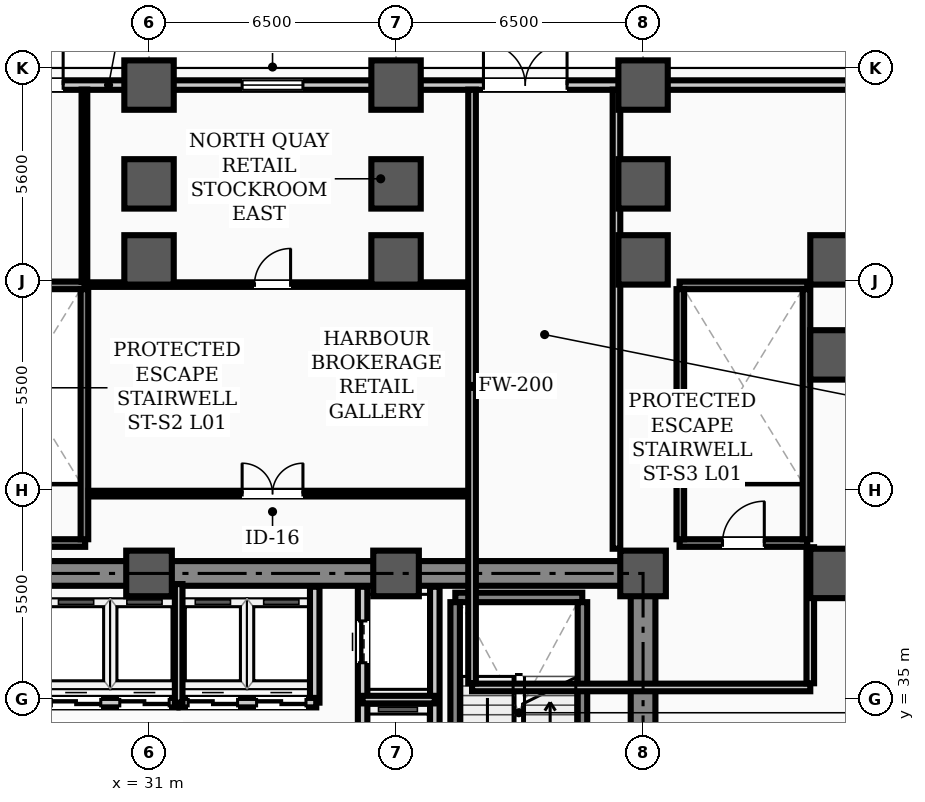
"""IFC4 building model, lengths in metres.
Left out: names, types, materials, properties, quantities, classifications, styles, units other than length and angle.
Written with IfcOpenShell. Run it as: python <this file> out.ifc"""

import sys

from ifc_helpers import new_model, si_unit, direction, frame, frame_2d, origin, origin_2d, place, context, subcontext, project, spatial, rectangle, hollow_rectangle, extrude, element, fill, save


model = new_model("IFC4")
c1 = context("Model", 3, precision=1e-05, world=origin(), true_north=direction((0.0, 1.0)))
c2 = subcontext(c1, "Body", "Model", "MODEL_VIEW")
j1 = project(units=[si_unit("LENGTHUNIT", "METRE"), si_unit("PLANEANGLEUNIT", "RADIAN")], contexts=[c1])
p1 = place(None, origin())
s1 = spatial("IfcSite", under=j1, at=p1, CompositionType="ELEMENT")
p2 = place(p1, origin())
s2 = spatial("IfcBuilding", under=s1, at=p2, CompositionType="ELEMENT")
p3 = place(p2, origin())
s3 = spatial("IfcBuildingStorey", under=s2, at=p3, CompositionType="ELEMENT", Elevation=0.0)
for number, where, z_axis, x_axis in (
    (1, (31.0, 38.3, 0.0), (0.0, 0.0, 1.0), (1.0, 0.0, 0.0)),
    (2, (37.5, 38.3, 0.0), (0.0, 0.0, 1.0), (1.0, 0.0, 0.0)),
    (3, (44.0, 38.3, 0.0), (0.0, 0.0, 1.0), (1.0, 0.0, 0.0)),
):
    element("IfcColumn", number, at=place(p3, frame(where, z_axis=z_axis, x_axis=x_axis)), inside=s3, PredefinedType="COLUMN", context=c2, shape_type="SweptSolid", body=[
        extrude(hollow_rectangle(XDim=1.2, YDim=1.2, WallThickness=0.04, InnerFilletRadius=0.02, OuterFilletRadius=0.06, at=origin_2d()), origin(), (0.0, 0.0, 1.0), 5.8),
    ])
for number, where, z_axis, x_axis in (
    (4, (31.0, 46.55, 0.0), (0.0, 0.0, 1.0), (1.0, 0.0, 0.0)),
    (5, (31.0, 48.55, 0.0), (0.0, 0.0, 1.0), (1.0, 0.0, 0.0)),
    (6, (31.0, 51.15, 0.0), (0.0, 0.0, 1.0), (1.0, 0.0, 0.0)),
    (7, (37.5, 46.55, 0.0), (0.0, 0.0, 1.0), (1.0, 0.0, 0.0)),
    (8, (37.5, 48.55, 0.0), (0.0, 0.0, 1.0), (1.0, 0.0, 0.0)),
    (9, (37.5, 51.15, 0.0), (0.0, 0.0, 1.0), (1.0, 0.0, 0.0)),
    (10, (44.0, 46.55, 0.0), (0.0, 0.0, 1.0), (1.0, 0.0, 0.0)),
    (11, (44.0, 48.55, 0.0), (0.0, 0.0, 1.0), (1.0, 0.0, 0.0)),
    (12, (44.0, 51.15, 0.0), (0.0, 0.0, 1.0), (1.0, 0.0, 0.0)),
    (13, (49.05, 38.3, 0.0), (0.0, 0.0, 1.0), (1.0, 0.0, 0.0)),
    (14, (49.05, 44.05, 0.0), (0.0, 0.0, 1.0), (1.0, 0.0, 0.0)),
    (15, (49.05, 46.55, 0.0), (0.0, 0.0, 1.0), (1.0, 0.0, 0.0)),
):
    element("IfcColumn", number, at=place(p3, frame(where, z_axis=z_axis, x_axis=x_axis)), inside=s3, PredefinedType="COLUMN", context=c2, shape_type="SweptSolid", body=[
        extrude(rectangle(XDim=1.3, YDim=1.3, at=origin_2d()), origin(), (0.0, 0.0, 1.0), 5.8),
    ])
p4 = place(p3, frame((0.45, 51.15, 0.0), z_axis=(0.0, 0.0, 1.0), x_axis=(1.0, 0.0, 0.0)))
e16 = element("IfcWall", 16, at=p4, inside=s3, PredefinedType="STANDARD", context=c2, shape_type="SweptSolid", body=[
    extrude(rectangle(XDim=58.97, YDim=0.25, at=frame_2d((29.485, 0.0))), origin(), (0.0, 0.0, 1.0), 4.75),
])
p5 = place(p4, frame((6.49, 0.0, 0.0)))
e17 = element("IfcOpeningElement", 17, at=p5, cuts=e16, PredefinedType="OPENING", context=c2, shape_type="SweptSolid", body=[
    extrude(rectangle(XDim=2.2, YDim=2.4, at=frame_2d((1.1, 1.2))), frame((0.0, 0.135, 0.0), z_axis=(0.0, -1.0, 0.0), x_axis=(1.0, 0.0, 0.0)), (0.0, 0.0, 1.0), 0.27),
])
p6 = place(p4, frame((17.25, 0.0, 0.0)))
e18 = element("IfcOpeningElement", 18, at=p6, cuts=e16, PredefinedType="OPENING", context=c2, shape_type="SweptSolid", body=[
    extrude(rectangle(XDim=2.2, YDim=2.4, at=frame_2d((1.1, 1.2))), frame((0.0, 0.135, 0.0), z_axis=(0.0, -1.0, 0.0), x_axis=(1.0, 0.0, 0.0)), (0.0, 0.0, 1.0), 0.27),
])
p7 = place(p4, frame((26.09, 0.0, 0.0)))
e19 = element("IfcOpeningElement", 19, at=p7, cuts=e16, PredefinedType="OPENING", context=c2, shape_type="SweptSolid", body=[
    extrude(rectangle(XDim=2.2, YDim=2.4, at=frame_2d((1.1, 1.2))), frame((0.0, 0.135, 0.0), z_axis=(0.0, -1.0, 0.0), x_axis=(1.0, 0.0, 0.0)), (0.0, 0.0, 1.0), 0.27),
])
p8 = place(p4, frame((39.35, 0.0, 0.0)))
e20 = element("IfcOpeningElement", 20, at=p8, cuts=e16, PredefinedType="OPENING", context=c2, shape_type="SweptSolid", body=[
    extrude(rectangle(XDim=2.2, YDim=2.4, at=frame_2d((1.1, 1.2))), frame((0.0, 0.135, 0.0), z_axis=(0.0, -1.0, 0.0), x_axis=(1.0, 0.0, 0.0)), (0.0, 0.0, 1.0), 0.27),
])
p9 = place(p4, frame((33.0, 0.0, 1.05)))
e21 = element("IfcOpeningElement", 21, at=p9, cuts=e16, PredefinedType="OPENING", context=c2, shape_type="SweptSolid", body=[
    extrude(rectangle(XDim=1.6, YDim=1.5, at=frame_2d((0.8, 0.75))), frame((0.0, 0.135, 0.0), z_axis=(0.0, -1.0, 0.0), x_axis=(1.0, 0.0, 0.0)), (0.0, 0.0, 1.0), 0.27),
])
p10 = place(p3, frame((13.5, 38.3, 0.0), z_axis=(0.0, 0.0, 1.0), x_axis=(1.0, 0.0, 0.0)))
e22 = element("IfcWall", 22, at=p10, inside=s3, PredefinedType="SHEAR", context=c2, shape_type="SweptSolid", body=[
    extrude(rectangle(XDim=30.5, YDim=0.65, at=frame_2d((15.25, 0.0))), origin(), (0.0, 0.0, 1.0), 5.55),
])
p11 = place(p3, frame((44.0, 29.35, 0.0), z_axis=(0.0, 0.0, 1.0), x_axis=(0.0, 1.0, 0.0)))
e23 = element("IfcWall", 23, at=p11, inside=s3, PredefinedType="SHEAR", context=c2, shape_type="SweptSolid", body=[
    extrude(rectangle(XDim=8.6, YDim=0.65, at=frame_2d((4.3, 0.0))), origin(), (0.0, 0.0, 1.0), 5.55),
])
p12 = place(p3, frame((39.06, 37.669, 0.0), z_axis=(0.0, 0.0, 1.0), x_axis=(1.0, 0.0, 0.0)))
e24 = element("IfcWall", 24, at=p12, inside=s3, PredefinedType="STANDARD", context=c2, shape_type="SweptSolid", body=[
    extrude(rectangle(XDim=3.34, YDim=0.25, at=frame_2d((1.67, 0.0))), origin(), (0.0, 0.0, 1.0), 5.55),
])
for number, where, z_axis, x_axis in (
    (25, (39.055, 30.36, 0.0), (0.0, 0.0, 1.0), (0.0, 1.0, 0.0)),
    (26, (42.405, 30.36, 0.0), (0.0, 0.0, 1.0), (0.0, 1.0, 0.0)),
):
    element("IfcWall", number, at=place(p3, frame(where, z_axis=z_axis, x_axis=x_axis)), inside=s3, PredefinedType="STANDARD", context=c2, shape_type="SweptSolid", body=[
        extrude(rectangle(XDim=7.184, YDim=0.25, at=frame_2d((3.592, 0.0))), origin(), (0.0, 0.0, 1.0), 5.55),
    ])
p13 = place(p3, frame((36.62, 31.95, 0.0), z_axis=(0.0, 0.0, 1.0), x_axis=(0.0, 1.0, 0.0)))
e27 = element("IfcWall", 27, at=p13, inside=s3, PredefinedType="STANDARD", context=c2, shape_type="SweptSolid", body=[
    extrude(rectangle(XDim=6.0, YDim=0.25, at=frame_2d((3.0, 0.0))), origin(), (0.0, 0.0, 1.0), 4.73),
])
p14 = place(p13, frame((0.9, 0.0, 0.0)))
e28 = element("IfcOpeningElement", 28, at=p14, cuts=e27, PredefinedType="OPENING", context=c2, shape_type="SweptSolid", body=[
    extrude(rectangle(XDim=1.1, YDim=2.08, at=frame_2d((0.55, 1.04))), frame((0.0, 0.135, 0.0), z_axis=(0.0, -1.0, 0.0), x_axis=(1.0, 0.0, 0.0)), (0.0, 0.0, 1.0), 0.27),
])
p15 = place(p13, frame((4.0, 0.0, 0.0)))
e29 = element("IfcOpeningElement", 29, at=p15, cuts=e27, PredefinedType="OPENING", context=c2, shape_type="SweptSolid", body=[
    extrude(rectangle(XDim=1.1, YDim=2.08, at=frame_2d((0.55, 1.04))), frame((0.0, 0.135, 0.0), z_axis=(0.0, -1.0, 0.0), x_axis=(1.0, 0.0, 0.0)), (0.0, 0.0, 1.0), 0.27),
])
p16 = place(p3, frame((38.52, 31.95, 0.0), z_axis=(0.0, 0.0, 1.0), x_axis=(0.0, 1.0, 0.0)))
e30 = element("IfcWall", 30, at=p16, inside=s3, PredefinedType="STANDARD", context=c2, shape_type="SweptSolid", body=[
    extrude(rectangle(XDim=6.0, YDim=0.25, at=frame_2d((3.0, 0.0))), origin(), (0.0, 0.0, 1.0), 4.73),
])
p17 = place(p3, frame((35.36, 34.9, 0.0), z_axis=(0.0, 0.0, 1.0), x_axis=(0.0, 1.0, 0.0)))
e31 = element("IfcWall", 31, at=p17, inside=s3, PredefinedType="STANDARD", context=c2, shape_type="SweptSolid", body=[
    extrude(rectangle(XDim=3.05, YDim=0.25, at=frame_2d((1.525, 0.0))), origin(), (0.0, 0.0, 1.0), 4.73),
])
p18 = place(p3, frame((28.2, 34.9, 0.0), z_axis=(0.0, 0.0, 1.0), x_axis=(1.0, 0.0, 0.0)))
e32 = element("IfcWall", 32, at=p18, inside=s3, PredefinedType="STANDARD", context=c2, shape_type="SweptSolid", body=[
    extrude(rectangle(XDim=3.55, YDim=0.25, at=frame_2d((1.775, 0.0))), origin(), (0.0, 0.0, 1.0), 5.55),
])
p19 = place(p18, frame((0.23, 0.0, 0.0)))
e33 = element("IfcOpeningElement", 33, at=p19, cuts=e32, PredefinedType="OPENING", context=c2, shape_type="SweptSolid", body=[
    extrude(rectangle(XDim=1.3, YDim=2.08, at=frame_2d((0.65, 1.04))), frame((0.0, 0.135, 0.0), z_axis=(0.0, -1.0, 0.0), x_axis=(1.0, 0.0, 0.0)), (0.0, 0.0, 1.0), 0.27),
])
p20 = place(p18, frame((2.03, 0.0, 0.0)))
e34 = element("IfcOpeningElement", 34, at=p20, cuts=e32, PredefinedType="OPENING", context=c2, shape_type="SweptSolid", body=[
    extrude(rectangle(XDim=1.3, YDim=2.08, at=frame_2d((0.65, 1.04))), frame((0.0, 0.135, 0.0), z_axis=(0.0, -1.0, 0.0), x_axis=(1.0, 0.0, 0.0)), (0.0, 0.0, 1.0), 0.27),
])
p21 = place(p3, frame((31.8, 34.9, 0.0), z_axis=(0.0, 0.0, 1.0), x_axis=(1.0, 0.0, 0.0)))
e35 = element("IfcWall", 35, at=p21, inside=s3, PredefinedType="STANDARD", context=c2, shape_type="SweptSolid", body=[
    extrude(rectangle(XDim=3.6, YDim=0.25, at=frame_2d((1.8, 0.0))), origin(), (0.0, 0.0, 1.0), 5.55),
])
p22 = place(p21, frame((0.23, 0.0, 0.0)))
e36 = element("IfcOpeningElement", 36, at=p22, cuts=e35, PredefinedType="OPENING", context=c2, shape_type="SweptSolid", body=[
    extrude(rectangle(XDim=1.3, YDim=2.08, at=frame_2d((0.65, 1.04))), frame((0.0, 0.135, 0.0), z_axis=(0.0, -1.0, 0.0), x_axis=(1.0, 0.0, 0.0)), (0.0, 0.0, 1.0), 0.27),
])
p23 = place(p21, frame((2.03, 0.0, 0.0)))
e37 = element("IfcOpeningElement", 37, at=p23, cuts=e35, PredefinedType="OPENING", context=c2, shape_type="SweptSolid", body=[
    extrude(rectangle(XDim=1.3, YDim=2.08, at=frame_2d((0.65, 1.04))), frame((0.0, 0.135, 0.0), z_axis=(0.0, -1.0, 0.0), x_axis=(1.0, 0.0, 0.0)), (0.0, 0.0, 1.0), 0.27),
])
p24 = place(p3, frame((25.96, 39.1, 0.0), z_axis=(0.0, 0.0, 1.0), x_axis=(1.0, 0.0, 0.0)))
e38 = element("IfcWall", 38, at=p24, inside=s3, PredefinedType="STANDARD", context=c2, shape_type="SweptSolid", body=[
    extrude(rectangle(XDim=3.36, YDim=0.2, at=frame_2d((1.68, 0.0))), origin(), (0.0, 0.0, 1.0), 5.55),
])
p25 = place(p24, frame((1.13, 0.0, 0.0)))
e39 = element("IfcOpeningElement", 39, at=p25, cuts=e38, PredefinedType="OPENING", context=c2, shape_type="SweptSolid", body=[
    extrude(rectangle(XDim=1.1, YDim=2.08, at=frame_2d((0.55, 1.04))), frame((0.0, 0.11, 0.0), z_axis=(0.0, -1.0, 0.0), x_axis=(1.0, 0.0, 0.0)), (0.0, 0.0, 1.0), 0.22),
])
p26 = place(p3, frame((25.96, 45.88, 0.0), z_axis=(0.0, 0.0, 1.0), x_axis=(1.0, 0.0, 0.0)))
e40 = element("IfcWall", 40, at=p26, inside=s3, PredefinedType="STANDARD", context=c2, shape_type="SweptSolid", body=[
    extrude(rectangle(XDim=3.36, YDim=0.2, at=frame_2d((1.68, 0.0))), origin(), (0.0, 0.0, 1.0), 5.55),
])
p27 = place(p3, frame((29.3, 39.2, 0.0), z_axis=(0.0, 0.0, 1.0), x_axis=(0.0, 1.0, 0.0)))
e41 = element("IfcWall", 41, at=p27, inside=s3, PredefinedType="STANDARD", context=c2, shape_type="SweptSolid", body=[
    extrude(rectangle(XDim=6.58, YDim=0.2, at=frame_2d((3.29, 0.0))), origin(), (0.0, 0.0, 1.0), 5.55),
])
p28 = place(p3, frame((44.96, 39.1, 0.0), z_axis=(0.0, 0.0, 1.0), x_axis=(1.0, 0.0, 0.0)))
e42 = element("IfcWall", 42, at=p28, inside=s3, PredefinedType="STANDARD", context=c2, shape_type="SweptSolid", body=[
    extrude(rectangle(XDim=3.36, YDim=0.2, at=frame_2d((1.68, 0.0))), origin(), (0.0, 0.0, 1.0), 5.55),
])
p29 = place(p28, frame((1.13, 0.0, 0.0)))
e43 = element("IfcOpeningElement", 43, at=p29, cuts=e42, PredefinedType="OPENING", context=c2, shape_type="SweptSolid", body=[
    extrude(rectangle(XDim=1.1, YDim=2.08, at=frame_2d((0.55, 1.04))), frame((0.0, 0.11, 0.0), z_axis=(0.0, -1.0, 0.0), x_axis=(1.0, 0.0, 0.0)), (0.0, 0.0, 1.0), 0.22),
])
p30 = place(p3, frame((44.96, 45.88, 0.0), z_axis=(0.0, 0.0, 1.0), x_axis=(1.0, 0.0, 0.0)))
e44 = element("IfcWall", 44, at=p30, inside=s3, PredefinedType="STANDARD", context=c2, shape_type="SweptSolid", body=[
    extrude(rectangle(XDim=3.36, YDim=0.2, at=frame_2d((1.68, 0.0))), origin(), (0.0, 0.0, 1.0), 5.55),
])
for number, where, z_axis, x_axis in (
    (45, (44.98, 39.2, 0.0), (0.0, 0.0, 1.0), (0.0, 1.0, 0.0)),
    (46, (48.3, 39.2, 0.0), (0.0, 0.0, 1.0), (0.0, 1.0, 0.0)),
):
    element("IfcWall", number, at=place(p3, frame(where, z_axis=z_axis, x_axis=x_axis)), inside=s3, PredefinedType="STANDARD", context=c2, shape_type="SweptSolid", body=[
        extrude(rectangle(XDim=6.58, YDim=0.2, at=frame_2d((3.29, 0.0))), origin(), (0.0, 0.0, 1.0), 5.55),
    ])
p31 = place(p3, frame((29.3, 45.9, 0.0), z_axis=(0.0, 0.0, 1.0), x_axis=(1.0, 0.0, 0.0)))
e47 = element("IfcWall", 47, at=p31, inside=s3, PredefinedType="PARTITIONING", context=c2, shape_type="SweptSolid", body=[
    extrude(rectangle(XDim=10.2, YDim=0.12, at=frame_2d((5.1, 0.0))), origin(), (0.0, 0.0, 1.0), 4.83),
])
p32 = place(p31, frame((4.475, 0.0, 0.0)))
e48 = element("IfcOpeningElement", 48, at=p32, cuts=e47, PredefinedType="OPENING", context=c2, shape_type="SweptSolid", body=[
    extrude(rectangle(XDim=0.95, YDim=2.08, at=frame_2d((0.475, 1.04))), frame((0.0, 0.07, 0.0), z_axis=(0.0, -1.0, 0.0), x_axis=(1.0, 0.0, 0.0)), (0.0, 0.0, 1.0), 0.14),
])
p33 = place(p3, frame((39.5, 35.3, 0.0), z_axis=(0.0, 0.0, 1.0), x_axis=(1.0, 0.0, 0.0)))
e49 = element("IfcWall", 49, at=p33, inside=s3, PredefinedType="STANDARD", context=c2, shape_type="SweptSolid", body=[
    extrude(rectangle(XDim=8.9, YDim=0.2, at=frame_2d((4.45, 0.0))), origin(), (0.0, 0.0, 1.0), 4.83),
])
p34 = place(p3, frame((29.41, 40.4, 0.0), z_axis=(0.0, 0.0, 1.0), x_axis=(1.0, 0.0, 0.0)))
e50 = element("IfcWall", 50, at=p34, inside=s3, PredefinedType="PARTITIONING", context=c2, shape_type="SweptSolid", body=[
    extrude(rectangle(XDim=10.09, YDim=0.15, at=frame_2d((5.045, 0.0))), origin(), (0.0, 0.0, 1.0), 4.83),
])
p35 = place(p34, frame((4.04, 0.0, 0.0)))
e51 = element("IfcOpeningElement", 51, at=p35, cuts=e50, PredefinedType="OPENING", context=c2, shape_type="SweptSolid", body=[
    extrude(rectangle(XDim=1.6, YDim=2.08, at=frame_2d((0.8, 1.04))), frame((0.0, 0.085, 0.0), z_axis=(0.0, -1.0, 0.0), x_axis=(1.0, 0.0, 0.0)), (0.0, 0.0, 1.0), 0.17),
])
p36 = place(p3, frame((29.3, 45.97, 0.0), z_axis=(0.0, 0.0, 1.0), x_axis=(0.0, 1.0, 0.0)))
e52 = element("IfcWall", 52, at=p36, inside=s3, PredefinedType="PARTITIONING", context=c2, shape_type="SweptSolid", body=[
    extrude(rectangle(XDim=5.06, YDim=0.15, at=frame_2d((2.53, 0.0))), origin(), (0.0, 0.0, 1.0), 4.73),
])
p37 = place(p3, frame((48.4, 35.41, 0.0), z_axis=(0.0, 0.0, 1.0), x_axis=(0.0, 1.0, 0.0)))
e53 = element("IfcWall", 53, at=p37, inside=s3, PredefinedType="STANDARD", context=c2, shape_type="SweptSolid", body=[
    extrude(rectangle(XDim=3.58, YDim=0.2, at=frame_2d((1.79, 0.0))), origin(), (0.0, 0.0, 1.0), 4.73),
])
p38 = place(p3, frame((39.5, 35.41, 0.0), z_axis=(0.0, 0.0, 1.0), x_axis=(0.0, 1.0, 0.0)))
e54 = element("IfcWall", 54, at=p38, inside=s3, PredefinedType="STANDARD", context=c2, shape_type="SweptSolid", body=[
    extrude(rectangle(XDim=15.62, YDim=0.2, at=frame_2d((7.81, 0.0))), origin(), (0.0, 0.0, 1.0), 4.73),
])
p39 = place(p3, frame((43.3, 38.95, 0.0), z_axis=(0.0, 0.0, 1.0), x_axis=(0.0, 1.0, 0.0)))
e55 = element("IfcWall", 55, at=p39, inside=s3, PredefinedType="STANDARD", context=c2, shape_type="SweptSolid", body=[
    extrude(rectangle(XDim=12.08, YDim=0.2, at=frame_2d((6.04, 0.0))), origin(), (0.0, 0.0, 1.0), 4.73),
])
p40 = place(p3, frame((36.62, 34.98, 0.0), z_axis=(0.0, 0.0, 1.0), x_axis=(1.0, 0.0, 0.0)))
e56 = element("IfcWall", 56, at=p40, inside=s3, PredefinedType="STANDARD", context=c2, shape_type="SweptSolid", body=[
    extrude(rectangle(XDim=1.9, YDim=0.2, at=frame_2d((0.95, 0.0))), origin(), (0.0, 0.0, 1.0), 5.55),
])
p41 = place(p3, frame((31.78, 34.9, 0.0), z_axis=(0.0, 0.0, 1.0), x_axis=(0.0, 1.0, 0.0)))
e57 = element("IfcWall", 57, at=p41, inside=s3, PredefinedType="STANDARD", context=c2, shape_type="SweptSolid", body=[
    extrude(rectangle(XDim=3.12, YDim=0.2, at=frame_2d((1.56, 0.0))), origin(), (0.0, 0.0, 1.0), 4.73),
])
p42 = place(p7, origin())
e58 = element("IfcDoor", 58, at=p42, inside=s3, OperationType="DOUBLE_DOOR_SINGLE_SWING", PredefinedType="DOOR", context=c2, shape_type="SweptSolid", body=[
    extrude(rectangle(XDim=2.2, YDim=2.4, at=frame_2d((1.1, 1.2))), frame((0.0, 0.025, 0.0), z_axis=(0.0, -1.0, 0.0), x_axis=(1.0, 0.0, 0.0)), (0.0, 0.0, 1.0), 0.05),
])
fill(e19, e58)
p43 = place(p8, origin())
e59 = element("IfcDoor", 59, at=p43, inside=s3, OperationType="DOUBLE_DOOR_SINGLE_SWING", PredefinedType="DOOR", context=c2, shape_type="SweptSolid", body=[
    extrude(rectangle(XDim=2.2, YDim=2.4, at=frame_2d((1.1, 1.2))), frame((0.0, 0.025, 0.0), z_axis=(0.0, -1.0, 0.0), x_axis=(1.0, 0.0, 0.0)), (0.0, 0.0, 1.0), 0.05),
])
fill(e20, e59)
p44 = place(p9, origin())
e60 = element("IfcWindow", 60, at=p44, inside=s3, PartitioningType="SINGLE_PANEL", PredefinedType="WINDOW", context=c2, shape_type="SweptSolid", body=[
    extrude(rectangle(XDim=1.6, YDim=1.5, at=frame_2d((0.8, 0.75))), frame((0.0, 0.03, 0.0), z_axis=(0.0, -1.0, 0.0), x_axis=(1.0, 0.0, 0.0)), (0.0, 0.0, 1.0), 0.06),
])
fill(e21, e60)
p45 = place(p29, origin())
e61 = element("IfcDoor", 61, at=p45, inside=s3, OperationType="SINGLE_SWING_RIGHT", PredefinedType="DOOR", context=c2, shape_type="SweptSolid", body=[
    extrude(rectangle(XDim=1.1, YDim=2.08, at=frame_2d((0.55, 1.04))), frame((0.0, 0.025, 0.0), z_axis=(0.0, -1.0, 0.0), x_axis=(1.0, 0.0, 0.0)), (0.0, 0.0, 1.0), 0.05),
])
fill(e43, e61)
p46 = place(p35, origin())
e62 = element("IfcDoor", 62, at=p46, inside=s3, OperationType="DOUBLE_DOOR_SINGLE_SWING", PredefinedType="DOOR", context=c2, shape_type="SweptSolid", body=[
    extrude(rectangle(XDim=1.6, YDim=2.08, at=frame_2d((0.8, 1.04))), frame((0.0, 0.025, 0.0), z_axis=(0.0, -1.0, 0.0), x_axis=(1.0, 0.0, 0.0)), (0.0, 0.0, 1.0), 0.05),
])
fill(e51, e62)
p47 = place(p32, origin())
e63 = element("IfcDoor", 63, at=p47, inside=s3, OperationType="SINGLE_SWING_RIGHT", PredefinedType="DOOR", context=c2, shape_type="SweptSolid", body=[
    extrude(rectangle(XDim=0.95, YDim=2.08, at=frame_2d((0.475, 1.04))), frame((0.0, 0.025, 0.0), z_axis=(0.0, -1.0, 0.0), x_axis=(1.0, 0.0, 0.0)), (0.0, 0.0, 1.0), 0.05),
])
fill(e48, e63)
p48 = place(p15, origin())
e64 = element("IfcDoor", 64, at=p48, inside=s3, OperationType="SLIDING_TO_LEFT", PredefinedType="DOOR", context=c2, shape_type="SweptSolid", body=[
    extrude(rectangle(XDim=1.1, YDim=2.08, at=frame_2d((0.55, 1.04))), frame((0.0, 0.025, 0.0), z_axis=(0.0, -1.0, 0.0), x_axis=(1.0, 0.0, 0.0)), (0.0, 0.0, 1.0), 0.05),
])
fill(e29, e64)
p49 = place(p19, origin())
e65 = element("IfcDoor", 65, at=p49, inside=s3, OperationType="DOUBLE_DOOR_SLIDING", PredefinedType="DOOR", context=c2, shape_type="SweptSolid", body=[
    extrude(rectangle(XDim=1.3, YDim=2.08, at=frame_2d((0.65, 1.04))), frame((0.0, 0.025, 0.0), z_axis=(0.0, -1.0, 0.0), x_axis=(1.0, 0.0, 0.0)), (0.0, 0.0, 1.0), 0.05),
])
fill(e33, e65)
p50 = place(p20, origin())
e66 = element("IfcDoor", 66, at=p50, inside=s3, OperationType="DOUBLE_DOOR_SLIDING", PredefinedType="DOOR", context=c2, shape_type="SweptSolid", body=[
    extrude(rectangle(XDim=1.3, YDim=2.08, at=frame_2d((0.65, 1.04))), frame((0.0, 0.025, 0.0), z_axis=(0.0, -1.0, 0.0), x_axis=(1.0, 0.0, 0.0)), (0.0, 0.0, 1.0), 0.05),
])
fill(e34, e66)
p51 = place(p22, origin())
e67 = element("IfcDoor", 67, at=p51, inside=s3, OperationType="DOUBLE_DOOR_SLIDING", PredefinedType="DOOR", context=c2, shape_type="SweptSolid", body=[
    extrude(rectangle(XDim=1.3, YDim=2.08, at=frame_2d((0.65, 1.04))), frame((0.0, 0.025, 0.0), z_axis=(0.0, -1.0, 0.0), x_axis=(1.0, 0.0, 0.0)), (0.0, 0.0, 1.0), 0.05),
])
fill(e36, e67)
p52 = place(p23, origin())
e68 = element("IfcDoor", 68, at=p52, inside=s3, OperationType="DOUBLE_DOOR_SLIDING", PredefinedType="DOOR", context=c2, shape_type="SweptSolid", body=[
    extrude(rectangle(XDim=1.3, YDim=2.08, at=frame_2d((0.65, 1.04))), frame((0.0, 0.025, 0.0), z_axis=(0.0, -1.0, 0.0), x_axis=(1.0, 0.0, 0.0)), (0.0, 0.0, 1.0), 0.05),
])
fill(e37, e68)
save(model, sys.argv[1])
